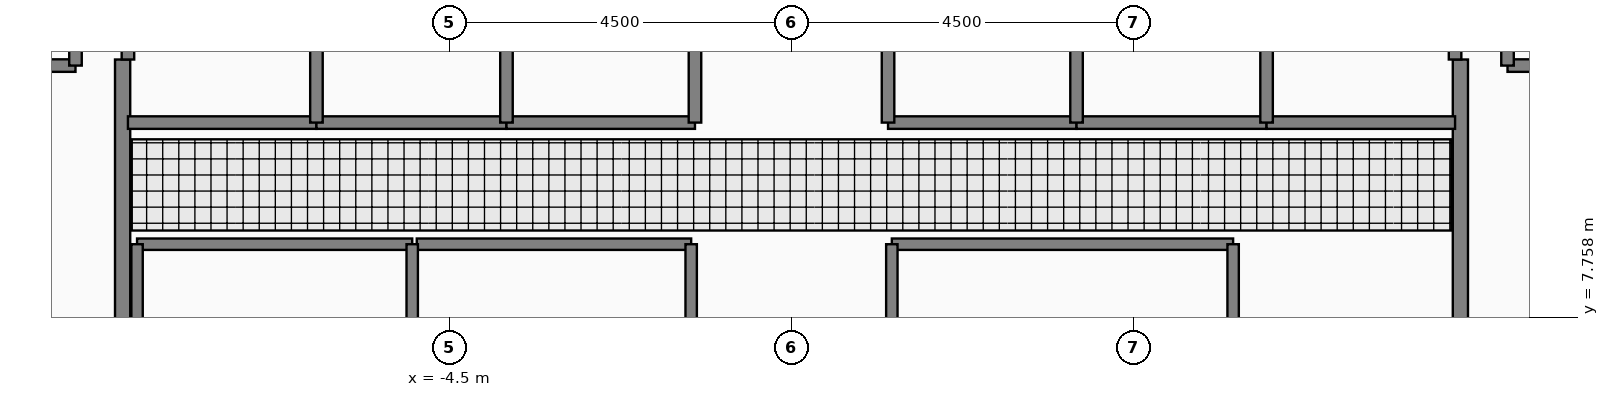
"""IFC4 building model, lengths in metres.
Left out: names, types, materials, properties, quantities, classifications, styles, units other than length and angle.
Written with IfcOpenShell. Run it as: python <this file> out.ifc"""

import sys

from ifc_helpers import new_model, si_unit, direction, frame, frame_2d, origin, place, context, subcontext, project, spatial, rectangle, extrude, element, fill, save


model = new_model("IFC4")
c1 = context("Model", 3, precision=1e-05, world=origin(), true_north=direction((0.0, 1.0)))
c2 = subcontext(c1, "Body", "Model", "MODEL_VIEW")
j1 = project(units=[si_unit("LENGTHUNIT", "METRE"), si_unit("PLANEANGLEUNIT", "RADIAN")], contexts=[c1])
p1 = place(None, origin())
s1 = spatial("IfcSite", under=j1, at=p1, CompositionType="ELEMENT")
p2 = place(p1, origin())
s2 = spatial("IfcBuilding", under=s1, at=p2, CompositionType="ELEMENT")
p3 = place(p2, frame((0.0, 0.0, 154.05)))
s3 = spatial("IfcBuildingStorey", under=s2, at=p3, CompositionType="ELEMENT", Elevation=154.05)
p4 = place(p3, frame((-8.8, 5.05, 0.0), z_axis=(0.0, 0.0, 1.0), x_axis=(0.0, 1.0, 0.0)))
e1 = element("IfcWall", 1, at=p4, inside=s3, PredefinedType="PARTITIONING", context=c2, shape_type="SweptSolid", body=[
    extrude(rectangle(XDim=6.1, YDim=0.2, at=frame_2d((3.05, 0.0))), origin(), (0.0, 0.0, 1.0), 4.28),
])
p5 = place(p4, frame((0.25, 0.0, 0.0)))
e2 = element("IfcOpeningElement", 2, at=p5, cuts=e1, PredefinedType="OPENING", context=c2, shape_type="SweptSolid", body=[
    extrude(rectangle(XDim=1.1, YDim=2.2, at=frame_2d((0.55, 1.1))), frame((0.0, 0.11, 0.0), z_axis=(0.0, -1.0, 0.0), x_axis=(1.0, 0.0, 0.0)), (0.0, 0.0, 1.0), 0.22),
])
p6 = place(p4, frame((3.85, 0.0, 0.0)))
e3 = element("IfcOpeningElement", 3, at=p6, cuts=e1, PredefinedType="OPENING", context=c2, shape_type="SweptSolid", body=[
    extrude(rectangle(XDim=1.1, YDim=2.2, at=frame_2d((0.55, 1.1))), frame((0.0, 0.11, 0.0), z_axis=(0.0, -1.0, 0.0), x_axis=(1.0, 0.0, 0.0)), (0.0, 0.0, 1.0), 0.22),
])
p7 = place(p3, frame((8.8, 11.15, 0.0), z_axis=(0.0, 0.0, 1.0), x_axis=(0.0, -1.0, 0.0)))
e4 = element("IfcWall", 4, at=p7, inside=s3, PredefinedType="PARTITIONING", context=c2, shape_type="SweptSolid", body=[
    extrude(rectangle(XDim=6.1, YDim=0.2, at=frame_2d((3.05, 0.0))), origin(), (0.0, 0.0, 1.0), 4.28),
])
p8 = place(p7, frame((1.15, 0.0, 0.0)))
e5 = element("IfcOpeningElement", 5, at=p8, cuts=e4, PredefinedType="OPENING", context=c2, shape_type="SweptSolid", body=[
    extrude(rectangle(XDim=1.1, YDim=2.2, at=frame_2d((0.55, 1.1))), frame((0.0, 0.11, 0.0), z_axis=(0.0, -1.0, 0.0), x_axis=(1.0, 0.0, 0.0)), (0.0, 0.0, 1.0), 0.22),
])
p9 = place(p7, frame((4.75, 0.0, 0.0)))
e6 = element("IfcOpeningElement", 6, at=p9, cuts=e4, PredefinedType="OPENING", context=c2, shape_type="SweptSolid", body=[
    extrude(rectangle(XDim=1.1, YDim=2.2, at=frame_2d((0.55, 1.1))), frame((0.0, 0.11, 0.0), z_axis=(0.0, -1.0, 0.0), x_axis=(1.0, 0.0, 0.0)), (0.0, 0.0, 1.0), 0.22),
])
p10 = place(p3, frame((-11.58, 11.07, 0.0), z_axis=(0.0, 0.0, 1.0), x_axis=(1.0, 0.0, 0.0)))
e7 = element("IfcWall", 7, at=p10, inside=s3, PredefinedType="PARTITIONING", context=c2, shape_type="SweptSolid", body=[
    extrude(rectangle(XDim=2.16, YDim=0.165, at=frame_2d((1.08, 0.0))), origin(), (0.0, 0.0, 1.0), 4.28),
])
p11 = place(p10, frame((0.53, 0.0, 0.0)))
e8 = element("IfcOpeningElement", 8, at=p11, cuts=e7, PredefinedType="OPENING", context=c2, shape_type="SweptSolid", body=[
    extrude(rectangle(XDim=1.15, YDim=2.25, at=frame_2d((0.575, 1.125))), frame((0.0, 0.093, 0.0), z_axis=(0.0, -1.0, 0.0), x_axis=(1.0, 0.0, 0.0)), (0.0, 0.0, 1.0), 0.185),
])
p12 = place(p3, frame((9.42, 11.07, 0.0), z_axis=(0.0, 0.0, 1.0), x_axis=(1.0, 0.0, 0.0)))
e9 = element("IfcWall", 9, at=p12, inside=s3, PredefinedType="PARTITIONING", context=c2, shape_type="SweptSolid", body=[
    extrude(rectangle(XDim=2.16, YDim=0.165, at=frame_2d((1.08, 0.0))), origin(), (0.0, 0.0, 1.0), 4.28),
])
p13 = place(p12, frame((0.53, 0.0, 0.0)))
e10 = element("IfcOpeningElement", 10, at=p13, cuts=e9, PredefinedType="OPENING", context=c2, shape_type="SweptSolid", body=[
    extrude(rectangle(XDim=1.15, YDim=2.25, at=frame_2d((0.575, 1.125))), frame((0.0, 0.093, 0.0), z_axis=(0.0, -1.0, 0.0), x_axis=(1.0, 0.0, 0.0)), (0.0, 0.0, 1.0), 0.185),
])
p14 = place(p3, frame((-8.73, 10.32, 0.0), z_axis=(0.0, 0.0, 1.0), x_axis=(1.0, 0.0, 0.0)))
e11 = element("IfcWall", 11, at=p14, inside=s3, PredefinedType="PARTITIONING", context=c2, shape_type="SweptSolid", body=[
    extrude(rectangle(XDim=2.48, YDim=0.165, at=frame_2d((1.24, 0.0))), origin(), (0.0, 0.0, 1.0), 4.28),
])
p15 = place(p14, frame((0.69, 0.0, 0.0)))
e12 = element("IfcOpeningElement", 12, at=p15, cuts=e11, PredefinedType="OPENING", context=c2, shape_type="SweptSolid", body=[
    extrude(rectangle(XDim=1.1, YDim=2.25, at=frame_2d((0.55, 1.125))), frame((0.0, 0.093, 0.0), z_axis=(0.0, -1.0, 0.0), x_axis=(1.0, 0.0, 0.0)), (0.0, 0.0, 1.0), 0.185),
])
p16 = place(p3, frame((-6.25, 10.32, 0.0), z_axis=(0.0, 0.0, 1.0), x_axis=(1.0, 0.0, 0.0)))
e13 = element("IfcWall", 13, at=p16, inside=s3, PredefinedType="PARTITIONING", context=c2, shape_type="SweptSolid", body=[
    extrude(rectangle(XDim=2.5, YDim=0.165, at=frame_2d((1.25, 0.0))), origin(), (0.0, 0.0, 1.0), 4.28),
])
p17 = place(p16, frame((0.7, 0.0, 0.0)))
e14 = element("IfcOpeningElement", 14, at=p17, cuts=e13, PredefinedType="OPENING", context=c2, shape_type="SweptSolid", body=[
    extrude(rectangle(XDim=1.1, YDim=2.25, at=frame_2d((0.55, 1.125))), frame((0.0, 0.093, 0.0), z_axis=(0.0, -1.0, 0.0), x_axis=(1.0, 0.0, 0.0)), (0.0, 0.0, 1.0), 0.185),
])
p18 = place(p3, frame((-3.75, 10.32, 0.0), z_axis=(0.0, 0.0, 1.0), x_axis=(1.0, 0.0, 0.0)))
e15 = element("IfcWall", 15, at=p18, inside=s3, PredefinedType="PARTITIONING", context=c2, shape_type="SweptSolid", body=[
    extrude(rectangle(XDim=2.48, YDim=0.165, at=frame_2d((1.24, 0.0))), origin(), (0.0, 0.0, 1.0), 4.28),
])
p19 = place(p18, frame((0.69, 0.0, 0.0)))
e16 = element("IfcOpeningElement", 16, at=p19, cuts=e15, PredefinedType="OPENING", context=c2, shape_type="SweptSolid", body=[
    extrude(rectangle(XDim=1.1, YDim=2.25, at=frame_2d((0.55, 1.125))), frame((0.0, 0.093, 0.0), z_axis=(0.0, -1.0, 0.0), x_axis=(1.0, 0.0, 0.0)), (0.0, 0.0, 1.0), 0.185),
])
p20 = place(p3, frame((1.27, 10.32, 0.0), z_axis=(0.0, 0.0, 1.0), x_axis=(1.0, 0.0, 0.0)))
e17 = element("IfcWall", 17, at=p20, inside=s3, PredefinedType="PARTITIONING", context=c2, shape_type="SweptSolid", body=[
    extrude(rectangle(XDim=2.48, YDim=0.165, at=frame_2d((1.24, 0.0))), origin(), (0.0, 0.0, 1.0), 4.28),
])
p21 = place(p20, frame((0.69, 0.0, 0.0)))
e18 = element("IfcOpeningElement", 18, at=p21, cuts=e17, PredefinedType="OPENING", context=c2, shape_type="SweptSolid", body=[
    extrude(rectangle(XDim=1.1, YDim=2.25, at=frame_2d((0.55, 1.125))), frame((0.0, 0.093, 0.0), z_axis=(0.0, -1.0, 0.0), x_axis=(1.0, 0.0, 0.0)), (0.0, 0.0, 1.0), 0.185),
])
p22 = place(p3, frame((3.75, 10.32, 0.0), z_axis=(0.0, 0.0, 1.0), x_axis=(1.0, 0.0, 0.0)))
e19 = element("IfcWall", 19, at=p22, inside=s3, PredefinedType="PARTITIONING", context=c2, shape_type="SweptSolid", body=[
    extrude(rectangle(XDim=2.5, YDim=0.165, at=frame_2d((1.25, 0.0))), origin(), (0.0, 0.0, 1.0), 4.28),
])
p23 = place(p22, frame((0.7, 0.0, 0.0)))
e20 = element("IfcOpeningElement", 20, at=p23, cuts=e19, PredefinedType="OPENING", context=c2, shape_type="SweptSolid", body=[
    extrude(rectangle(XDim=1.1, YDim=2.25, at=frame_2d((0.55, 1.125))), frame((0.0, 0.093, 0.0), z_axis=(0.0, -1.0, 0.0), x_axis=(1.0, 0.0, 0.0)), (0.0, 0.0, 1.0), 0.185),
])
p24 = place(p3, frame((6.25, 10.32, 0.0), z_axis=(0.0, 0.0, 1.0), x_axis=(1.0, 0.0, 0.0)))
e21 = element("IfcWall", 21, at=p24, inside=s3, PredefinedType="PARTITIONING", context=c2, shape_type="SweptSolid", body=[
    extrude(rectangle(XDim=2.48, YDim=0.165, at=frame_2d((1.24, 0.0))), origin(), (0.0, 0.0, 1.0), 4.28),
])
p25 = place(p24, frame((0.69, 0.0, 0.0)))
e22 = element("IfcOpeningElement", 22, at=p25, cuts=e21, PredefinedType="OPENING", context=c2, shape_type="SweptSolid", body=[
    extrude(rectangle(XDim=1.1, YDim=2.25, at=frame_2d((0.55, 1.125))), frame((0.0, 0.093, 0.0), z_axis=(0.0, -1.0, 0.0), x_axis=(1.0, 0.0, 0.0)), (0.0, 0.0, 1.0), 0.185),
])
p26 = place(p3, frame((-4.93, 8.72, 0.0), z_axis=(0.0, 0.0, 1.0), x_axis=(1.0, 0.0, 0.0)))
e23 = element("IfcWall", 23, at=p26, inside=s3, PredefinedType="PARTITIONING", context=c2, shape_type="SweptSolid", body=[
    extrude(rectangle(XDim=3.61, YDim=0.15, at=frame_2d((1.805, 0.0))), origin(), (0.0, 0.0, 1.0), 4.28),
])
p27 = place(p26, frame((1.355, 0.0, 0.0)))
e24 = element("IfcOpeningElement", 24, at=p27, cuts=e23, PredefinedType="OPENING", context=c2, shape_type="SweptSolid", body=[
    extrude(rectangle(XDim=0.9, YDim=2.15, at=frame_2d((0.45, 1.075))), frame((0.0, 0.085, 0.0), z_axis=(0.0, -1.0, 0.0), x_axis=(1.0, 0.0, 0.0)), (0.0, 0.0, 1.0), 0.17),
])
for number, where, z_axis, x_axis in (
    (25, (-9.42, 11.07, 0.0), (0.0, 0.0, 1.0), (0.0, 1.0, 0.0)),
    (26, (9.42, 11.07, 0.0), (0.0, 0.0, 1.0), (0.0, 1.0, 0.0)),
):
    element("IfcWall", number, at=place(p3, frame(where, z_axis=z_axis, x_axis=x_axis)), inside=s3, PredefinedType="PARTITIONING", context=c2, shape_type="SweptSolid", body=[
        extrude(rectangle(XDim=2.96, YDim=0.165, at=frame_2d((1.48, 0.0))), origin(), (0.0, 0.0, 1.0), 4.28),
    ])
p28 = place(p3, frame((-8.73, 11.15, 0.0), z_axis=(0.0, 0.0, 1.0), x_axis=(0.0, 1.0, 0.0)))
e27 = element("IfcWall", 27, at=p28, inside=s3, PredefinedType="PARTITIONING", context=c2, shape_type="SweptSolid", body=[
    extrude(rectangle(XDim=1.53, YDim=0.165, at=frame_2d((0.765, 0.0))), origin(), (0.0, 0.0, 1.0), 4.28),
])
for number, where, z_axis, x_axis in (
    (28, (-6.25, 10.32, 0.0), (0.0, 0.0, 1.0), (0.0, 1.0, 0.0)),
    (29, (-3.75, 10.32, 0.0), (0.0, 0.0, 1.0), (0.0, 1.0, 0.0)),
    (30, (-1.27, 10.32, 0.0), (0.0, 0.0, 1.0), (0.0, 1.0, 0.0)),
    (31, (1.27, 10.32, 0.0), (0.0, 0.0, 1.0), (0.0, 1.0, 0.0)),
    (32, (3.75, 10.32, 0.0), (0.0, 0.0, 1.0), (0.0, 1.0, 0.0)),
    (33, (6.25, 10.32, 0.0), (0.0, 0.0, 1.0), (0.0, 1.0, 0.0)),
):
    element("IfcWall", number, at=place(p3, frame(where, z_axis=z_axis, x_axis=x_axis)), inside=s3, PredefinedType="PARTITIONING", context=c2, shape_type="SweptSolid", body=[
        extrude(rectangle(XDim=2.36, YDim=0.165, at=frame_2d((1.18, 0.0))), origin(), (0.0, 0.0, 1.0), 4.28),
    ])
p29 = place(p3, frame((8.73, 11.15, 0.0), z_axis=(0.0, 0.0, 1.0), x_axis=(0.0, 1.0, 0.0)))
e34 = element("IfcWall", 34, at=p29, inside=s3, PredefinedType="PARTITIONING", context=c2, shape_type="SweptSolid", body=[
    extrude(rectangle(XDim=1.53, YDim=0.165, at=frame_2d((0.765, 0.0))), origin(), (0.0, 0.0, 1.0), 4.28),
])
p30 = place(p3, frame((-8.61, 8.72, 0.0), z_axis=(0.0, 0.0, 1.0), x_axis=(1.0, 0.0, 0.0)))
e35 = element("IfcWall", 35, at=p30, inside=s3, PredefinedType="PARTITIONING", context=c2, shape_type="SweptSolid", body=[
    extrude(rectangle(XDim=3.62, YDim=0.15, at=frame_2d((1.81, 0.0))), origin(), (0.0, 0.0, 1.0), 4.28),
])
for number, where, z_axis, x_axis in (
    (36, (-8.61, 6.48, 0.0), (0.0, 0.0, 1.0), (0.0, 1.0, 0.0)),
    (37, (-4.99, 6.48, 0.0), (0.0, 0.0, 1.0), (0.0, 1.0, 0.0)),
    (38, (-1.32, 6.48, 0.0), (0.0, 0.0, 1.0), (0.0, 1.0, 0.0)),
):
    element("IfcWall", number, at=place(p3, frame(where, z_axis=z_axis, x_axis=x_axis)), inside=s3, PredefinedType="PARTITIONING", context=c2, shape_type="SweptSolid", body=[
        extrude(rectangle(XDim=2.24, YDim=0.15, at=frame_2d((1.12, 0.0))), origin(), (0.0, 0.0, 1.0), 4.28),
    ])
p31 = place(p3, frame((1.32, 8.72, 0.0), z_axis=(0.0, 0.0, 1.0), x_axis=(1.0, 0.0, 0.0)))
e39 = element("IfcWall", 39, at=p31, inside=s3, PredefinedType="PARTITIONING", context=c2, shape_type="SweptSolid", body=[
    extrude(rectangle(XDim=4.49, YDim=0.15, at=frame_2d((2.245, 0.0))), origin(), (0.0, 0.0, 1.0), 4.28),
])
for number, where, z_axis, x_axis in (
    (40, (1.32, 6.48, 0.0), (0.0, 0.0, 1.0), (0.0, 1.0, 0.0)),
    (41, (5.81, 6.48, 0.0), (0.0, 0.0, 1.0), (0.0, 1.0, 0.0)),
):
    element("IfcWall", number, at=place(p3, frame(where, z_axis=z_axis, x_axis=x_axis)), inside=s3, PredefinedType="PARTITIONING", context=c2, shape_type="SweptSolid", body=[
        extrude(rectangle(XDim=2.24, YDim=0.15, at=frame_2d((1.12, 0.0))), origin(), (0.0, 0.0, 1.0), 4.28),
    ])
p32 = place(p6, origin())
e42 = element("IfcDoor", 42, at=p32, inside=s3, OperationType="SINGLE_SWING_LEFT", PredefinedType="DOOR", context=c2, shape_type="SweptSolid", body=[
    extrude(rectangle(XDim=1.1, YDim=2.2, at=frame_2d((0.55, 1.1))), frame((0.0, 0.025, 0.0), z_axis=(0.0, -1.0, 0.0), x_axis=(1.0, 0.0, 0.0)), (0.0, 0.0, 1.0), 0.05),
])
fill(e3, e42)
p33 = place(p8, origin())
e43 = element("IfcDoor", 43, at=p33, inside=s3, OperationType="SINGLE_SWING_RIGHT", PredefinedType="DOOR", context=c2, shape_type="SweptSolid", body=[
    extrude(rectangle(XDim=1.1, YDim=2.2, at=frame_2d((0.55, 1.1))), frame((0.0, 0.025, 0.0), z_axis=(0.0, -1.0, 0.0), x_axis=(1.0, 0.0, 0.0)), (0.0, 0.0, 1.0), 0.05),
])
fill(e5, e43)
p34 = place(p15, origin())
e44 = element("IfcDoor", 44, at=p34, inside=s3, OperationType="SLIDING_TO_LEFT", PredefinedType="DOOR", context=c2, shape_type="SweptSolid", body=[
    extrude(rectangle(XDim=1.1, YDim=2.25, at=frame_2d((0.55, 1.125))), frame((0.0, 0.025, 0.0), z_axis=(0.0, -1.0, 0.0), x_axis=(1.0, 0.0, 0.0)), (0.0, 0.0, 1.0), 0.05),
])
fill(e12, e44)
p35 = place(p17, origin())
e45 = element("IfcDoor", 45, at=p35, inside=s3, OperationType="SLIDING_TO_LEFT", PredefinedType="DOOR", context=c2, shape_type="SweptSolid", body=[
    extrude(rectangle(XDim=1.1, YDim=2.25, at=frame_2d((0.55, 1.125))), frame((0.0, 0.025, 0.0), z_axis=(0.0, -1.0, 0.0), x_axis=(1.0, 0.0, 0.0)), (0.0, 0.0, 1.0), 0.05),
])
fill(e14, e45)
p36 = place(p19, origin())
e46 = element("IfcDoor", 46, at=p36, inside=s3, OperationType="SLIDING_TO_LEFT", PredefinedType="DOOR", context=c2, shape_type="SweptSolid", body=[
    extrude(rectangle(XDim=1.1, YDim=2.25, at=frame_2d((0.55, 1.125))), frame((0.0, 0.025, 0.0), z_axis=(0.0, -1.0, 0.0), x_axis=(1.0, 0.0, 0.0)), (0.0, 0.0, 1.0), 0.05),
])
fill(e16, e46)
p37 = place(p21, origin())
e47 = element("IfcDoor", 47, at=p37, inside=s3, OperationType="SLIDING_TO_LEFT", PredefinedType="DOOR", context=c2, shape_type="SweptSolid", body=[
    extrude(rectangle(XDim=1.1, YDim=2.25, at=frame_2d((0.55, 1.125))), frame((0.0, 0.025, 0.0), z_axis=(0.0, -1.0, 0.0), x_axis=(1.0, 0.0, 0.0)), (0.0, 0.0, 1.0), 0.05),
])
fill(e18, e47)
p38 = place(p23, origin())
e48 = element("IfcDoor", 48, at=p38, inside=s3, OperationType="SLIDING_TO_LEFT", PredefinedType="DOOR", context=c2, shape_type="SweptSolid", body=[
    extrude(rectangle(XDim=1.1, YDim=2.25, at=frame_2d((0.55, 1.125))), frame((0.0, 0.025, 0.0), z_axis=(0.0, -1.0, 0.0), x_axis=(1.0, 0.0, 0.0)), (0.0, 0.0, 1.0), 0.05),
])
fill(e20, e48)
p39 = place(p25, origin())
e49 = element("IfcDoor", 49, at=p39, inside=s3, OperationType="SLIDING_TO_LEFT", PredefinedType="DOOR", context=c2, shape_type="SweptSolid", body=[
    extrude(rectangle(XDim=1.1, YDim=2.25, at=frame_2d((0.55, 1.125))), frame((0.0, 0.025, 0.0), z_axis=(0.0, -1.0, 0.0), x_axis=(1.0, 0.0, 0.0)), (0.0, 0.0, 1.0), 0.05),
])
fill(e22, e49)
p40 = place(p27, origin())
e50 = element("IfcDoor", 50, at=p40, inside=s3, OperationType="SINGLE_SWING_LEFT", PredefinedType="DOOR", context=c2, shape_type="SweptSolid", body=[
    extrude(rectangle(XDim=0.9, YDim=2.15, at=frame_2d((0.45, 1.075))), frame((0.0, 0.025, 0.0), z_axis=(0.0, -1.0, 0.0), x_axis=(1.0, 0.0, 0.0)), (0.0, 0.0, 1.0), 0.05),
])
fill(e24, e50)
save(model, sys.argv[1])
